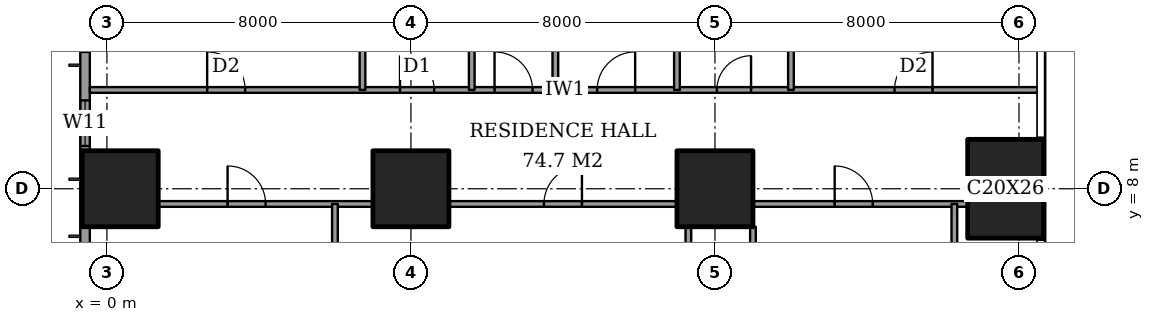
"""IFC4 building model, lengths in metres.
Left out: names, types, materials, properties, quantities, classifications, styles, units other than length and angle.
Written with IfcOpenShell. Run it as: python <this file> out.ifc"""

import sys

from ifc_helpers import new_model, si_unit, direction, frame, frame_2d, origin, origin_2d, place, context, subcontext, project, spatial, rectangle, extrude, element, fill, save


model = new_model("IFC4")
c1 = context("Model", 3, precision=1e-05, world=origin(), true_north=direction((0.0, 1.0)))
c2 = subcontext(c1, "Body", "Model", "MODEL_VIEW")
j1 = project(units=[si_unit("LENGTHUNIT", "METRE"), si_unit("PLANEANGLEUNIT", "RADIAN")], contexts=[c1])
p1 = place(None, origin())
s1 = spatial("IfcSite", under=j1, at=p1, CompositionType="ELEMENT")
p2 = place(p1, origin())
s2 = spatial("IfcBuilding", under=s1, at=p2, CompositionType="ELEMENT")
p3 = place(p2, frame((0.0, 0.0, 110.6)))
s3 = spatial("IfcBuildingStorey", under=s2, at=p3, CompositionType="ELEMENT", Elevation=110.6)
for number, where, z_axis, x_axis in (
    (1, (0.35, 8.0, 0.0), (0.0, 0.0, 1.0), (1.0, 0.0, 0.0)),
    (2, (8.0, 8.0, 0.0), (0.0, 0.0, 1.0), (1.0, 0.0, 0.0)),
    (3, (16.0, 8.0, 0.0), (0.0, 0.0, 1.0), (1.0, 0.0, 0.0)),
):
    element("IfcColumn", number, at=place(p3, frame(where, z_axis=z_axis, x_axis=x_axis)), inside=s3, PredefinedType="COLUMN", context=c2, shape_type="SweptSolid", body=[
        extrude(rectangle(XDim=2.0, YDim=2.0, at=origin_2d()), origin(), (0.0, 0.0, 1.0), 3.6),
    ])
p4 = place(p3, frame((23.65, 8.0, 0.0), z_axis=(0.0, 0.0, 1.0), x_axis=(1.0, 0.0, 0.0)))
e4 = element("IfcColumn", 4, at=p4, inside=s3, PredefinedType="COLUMN", context=c2, shape_type="SweptSolid", body=[
    extrude(rectangle(XDim=2.0, YDim=2.6, at=origin_2d()), origin(), (0.0, 0.0, 1.0), 3.6),
])
p5 = place(p3, frame((-0.575, 44.825, 0.0), z_axis=(0.0, 0.0, 1.0), x_axis=(0.0, -1.0, 0.0)))
e5 = element("IfcWall", 5, at=p5, inside=s3, PredefinedType="SOLIDWALL", context=c2, shape_type="SweptSolid", body=[
    extrude(rectangle(XDim=41.65, YDim=0.25, at=frame_2d((20.825, 0.0))), origin(), (0.0, 0.0, 1.0), 3.6),
])
p6 = place(p5, frame((0.775, 0.0, 0.4)))
e6 = element("IfcOpeningElement", 6, at=p6, cuts=e5, PredefinedType="OPENING", context=c2, shape_type="SweptSolid", body=[
    extrude(rectangle(XDim=2.4, YDim=2.2, at=frame_2d((1.2, 1.1))), frame((0.0, 0.135, 0.0), z_axis=(0.0, -1.0, 0.0), x_axis=(1.0, 0.0, 0.0)), (0.0, 0.0, 1.0), 0.27),
])
p7 = place(p5, frame((6.2, 0.0, 0.4)))
e7 = element("IfcOpeningElement", 7, at=p7, cuts=e5, PredefinedType="OPENING", context=c2, shape_type="SweptSolid", body=[
    extrude(rectangle(XDim=1.2, YDim=2.2, at=frame_2d((0.6, 1.1))), frame((0.0, 0.135, 0.0), z_axis=(0.0, -1.0, 0.0), x_axis=(1.0, 0.0, 0.0)), (0.0, 0.0, 1.0), 0.27),
])
p8 = place(p5, frame((8.525, 0.0, 0.4)))
e8 = element("IfcOpeningElement", 8, at=p8, cuts=e5, PredefinedType="OPENING", context=c2, shape_type="SweptSolid", body=[
    extrude(rectangle(XDim=2.4, YDim=2.2, at=frame_2d((1.2, 1.1))), frame((0.0, 0.135, 0.0), z_axis=(0.0, -1.0, 0.0), x_axis=(1.0, 0.0, 0.0)), (0.0, 0.0, 1.0), 0.27),
])
p9 = place(p5, frame((15.625, 0.0, 0.4)))
e9 = element("IfcOpeningElement", 9, at=p9, cuts=e5, PredefinedType="OPENING", context=c2, shape_type="SweptSolid", body=[
    extrude(rectangle(XDim=2.4, YDim=2.2, at=frame_2d((1.2, 1.1))), frame((0.0, 0.135, 0.0), z_axis=(0.0, -1.0, 0.0), x_axis=(1.0, 0.0, 0.0)), (0.0, 0.0, 1.0), 0.27),
])
p10 = place(p5, frame((23.625, 0.0, 0.4)))
e10 = element("IfcOpeningElement", 10, at=p10, cuts=e5, PredefinedType="OPENING", context=c2, shape_type="SweptSolid", body=[
    extrude(rectangle(XDim=2.4, YDim=2.2, at=frame_2d((1.2, 1.1))), frame((0.0, 0.135, 0.0), z_axis=(0.0, -1.0, 0.0), x_axis=(1.0, 0.0, 0.0)), (0.0, 0.0, 1.0), 0.27),
])
p11 = place(p5, frame((30.825, 0.0, 0.4)))
e11 = element("IfcOpeningElement", 11, at=p11, cuts=e5, PredefinedType="OPENING", context=c2, shape_type="SweptSolid", body=[
    extrude(rectangle(XDim=2.4, YDim=2.2, at=frame_2d((1.2, 1.1))), frame((0.0, 0.135, 0.0), z_axis=(0.0, -1.0, 0.0), x_axis=(1.0, 0.0, 0.0)), (0.0, 0.0, 1.0), 0.27),
])
p12 = place(p5, frame((34.5, 0.0, 0.4)))
e12 = element("IfcOpeningElement", 12, at=p12, cuts=e5, PredefinedType="OPENING", context=c2, shape_type="SweptSolid", body=[
    extrude(rectangle(XDim=1.2, YDim=2.2, at=frame_2d((0.6, 1.1))), frame((0.0, 0.135, 0.0), z_axis=(0.0, -1.0, 0.0), x_axis=(1.0, 0.0, 0.0)), (0.0, 0.0, 1.0), 0.27),
])
p13 = place(p5, frame((38.475, 0.0, 0.4)))
e13 = element("IfcOpeningElement", 13, at=p13, cuts=e5, PredefinedType="OPENING", context=c2, shape_type="SweptSolid", body=[
    extrude(rectangle(XDim=2.4, YDim=2.2, at=frame_2d((1.2, 1.1))), frame((0.0, 0.135, 0.0), z_axis=(0.0, -1.0, 0.0), x_axis=(1.0, 0.0, 0.0)), (0.0, 0.0, 1.0), 0.27),
])
p14 = place(p3, frame((1.35, 7.6, 0.0), z_axis=(0.0, 0.0, 1.0), x_axis=(1.0, 0.0, 0.0)))
e14 = element("IfcWall", 14, at=p14, inside=s3, PredefinedType="PARTITIONING", context=c2, shape_type="SweptSolid", body=[
    extrude(rectangle(XDim=5.65, YDim=0.15, at=frame_2d((2.825, 0.0))), origin(), (0.0, 0.0, 1.0), 3.35),
])
p15 = place(p14, frame((1.825, 0.0, 0.0)))
e15 = element("IfcOpeningElement", 15, at=p15, cuts=e14, PredefinedType="OPENING", context=c2, shape_type="SweptSolid", body=[
    extrude(rectangle(XDim=1.0, YDim=2.1, at=frame_2d((0.5, 1.05))), frame((0.0, 0.085, 0.0), z_axis=(0.0, -1.0, 0.0), x_axis=(1.0, 0.0, 0.0)), (0.0, 0.0, 1.0), 0.17),
])
p16 = place(p3, frame((9.0, 7.6, 0.0), z_axis=(0.0, 0.0, 1.0), x_axis=(1.0, 0.0, 0.0)))
e16 = element("IfcWall", 16, at=p16, inside=s3, PredefinedType="PARTITIONING", context=c2, shape_type="SweptSolid", body=[
    extrude(rectangle(XDim=6.0, YDim=0.15, at=frame_2d((3.0, 0.0))), origin(), (0.0, 0.0, 1.0), 3.35),
])
p17 = place(p16, frame((2.5, 0.0, 0.0)))
e17 = element("IfcOpeningElement", 17, at=p17, cuts=e16, PredefinedType="OPENING", context=c2, shape_type="SweptSolid", body=[
    extrude(rectangle(XDim=1.0, YDim=2.1, at=frame_2d((0.5, 1.05))), frame((0.0, 0.085, 0.0), z_axis=(0.0, -1.0, 0.0), x_axis=(1.0, 0.0, 0.0)), (0.0, 0.0, 1.0), 0.17),
])
p18 = place(p3, frame((17.0, 7.6, 0.0), z_axis=(0.0, 0.0, 1.0), x_axis=(1.0, 0.0, 0.0)))
e18 = element("IfcWall", 18, at=p18, inside=s3, PredefinedType="PARTITIONING", context=c2, shape_type="SweptSolid", body=[
    extrude(rectangle(XDim=5.65, YDim=0.15, at=frame_2d((2.825, 0.0))), origin(), (0.0, 0.0, 1.0), 3.35),
])
p19 = place(p18, frame((2.15, 0.0, 0.0)))
e19 = element("IfcOpeningElement", 19, at=p19, cuts=e18, PredefinedType="OPENING", context=c2, shape_type="SweptSolid", body=[
    extrude(rectangle(XDim=1.0, YDim=2.1, at=frame_2d((0.5, 1.05))), frame((0.0, 0.085, 0.0), z_axis=(0.0, -1.0, 0.0), x_axis=(1.0, 0.0, 0.0)), (0.0, 0.0, 1.0), 0.17),
])
p20 = place(p3, frame((-0.45, 10.6, 0.0), z_axis=(0.0, 0.0, 1.0), x_axis=(1.0, 0.0, 0.0)))
e20 = element("IfcWall", 20, at=p20, inside=s3, PredefinedType="PARTITIONING", context=c2, shape_type="SweptSolid", body=[
    extrude(rectangle(XDim=25.011, YDim=0.15, at=frame_2d((12.505, 0.0))), origin(), (0.0, 0.0, 1.0), 3.35),
])
p21 = place(p20, frame((10.65, 0.0, 0.0)))
e21 = element("IfcOpeningElement", 21, at=p21, cuts=e20, PredefinedType="OPENING", context=c2, shape_type="SweptSolid", body=[
    extrude(rectangle(XDim=1.0, YDim=2.1, at=frame_2d((0.5, 1.05))), frame((0.0, 0.085, 0.0), z_axis=(0.0, -1.0, 0.0), x_axis=(1.0, 0.0, 0.0)), (0.0, 0.0, 1.0), 0.17),
])
p22 = place(p20, frame((3.087, 0.0, 0.0)))
e22 = element("IfcOpeningElement", 22, at=p22, cuts=e20, PredefinedType="OPENING", context=c2, shape_type="SweptSolid", body=[
    extrude(rectangle(XDim=1.0, YDim=2.1, at=frame_2d((0.5, 1.05))), frame((0.0, 0.085, 0.0), z_axis=(0.0, -1.0, 0.0), x_axis=(1.0, 0.0, 0.0)), (0.0, 0.0, 1.0), 0.17),
])
p23 = place(p20, frame((8.163, 0.0, 0.0)))
e23 = element("IfcOpeningElement", 23, at=p23, cuts=e20, PredefinedType="OPENING", context=c2, shape_type="SweptSolid", body=[
    extrude(rectangle(XDim=0.9, YDim=2.1, at=frame_2d((0.45, 1.05))), frame((0.0, 0.085, 0.0), z_axis=(0.0, -1.0, 0.0), x_axis=(1.0, 0.0, 0.0)), (0.0, 0.0, 1.0), 0.17),
])
p24 = place(p20, frame((13.35, 0.0, 0.0)))
e24 = element("IfcOpeningElement", 24, at=p24, cuts=e20, PredefinedType="OPENING", context=c2, shape_type="SweptSolid", body=[
    extrude(rectangle(XDim=1.0, YDim=2.1, at=frame_2d((0.5, 1.05))), frame((0.0, 0.085, 0.0), z_axis=(0.0, -1.0, 0.0), x_axis=(1.0, 0.0, 0.0)), (0.0, 0.0, 1.0), 0.17),
])
p25 = place(p20, frame((16.5, 0.0, 0.0)))
e25 = element("IfcOpeningElement", 25, at=p25, cuts=e20, PredefinedType="OPENING", context=c2, shape_type="SweptSolid", body=[
    extrude(rectangle(XDim=0.9, YDim=2.1, at=frame_2d((0.45, 1.05))), frame((0.0, 0.085, 0.0), z_axis=(0.0, -1.0, 0.0), x_axis=(1.0, 0.0, 0.0)), (0.0, 0.0, 1.0), 0.17),
])
p26 = place(p20, frame((21.175, 0.0, 0.0)))
e26 = element("IfcOpeningElement", 26, at=p26, cuts=e20, PredefinedType="OPENING", context=c2, shape_type="SweptSolid", body=[
    extrude(rectangle(XDim=1.0, YDim=2.1, at=frame_2d((0.5, 1.05))), frame((0.0, 0.085, 0.0), z_axis=(0.0, -1.0, 0.0), x_axis=(1.0, 0.0, 0.0)), (0.0, 0.0, 1.0), 0.17),
])
p27 = place(p3, frame((6.0, -0.45, 0.0), z_axis=(0.0, 0.0, 1.0), x_axis=(0.0, 1.0, 0.0)))
e27 = element("IfcWall", 27, at=p27, inside=s3, PredefinedType="PARTITIONING", context=c2, shape_type="SweptSolid", body=[
    extrude(rectangle(XDim=8.05, YDim=0.15, at=frame_2d((4.025, 0.0))), origin(), (0.0, 0.0, 1.0), 3.35),
])
p28 = place(p3, frame((6.725, 10.6, 0.0), z_axis=(0.0, 0.0, 1.0), x_axis=(0.0, 1.0, 0.0)))
e28 = element("IfcWall", 28, at=p28, inside=s3, PredefinedType="PARTITIONING", context=c2, shape_type="SweptSolid", body=[
    extrude(rectangle(XDim=4.2, YDim=0.15, at=frame_2d((2.1, 0.0))), origin(), (0.0, 0.0, 1.0), 3.35),
])
p29 = place(p3, frame((9.6, 10.6, 0.0), z_axis=(0.0, 0.0, 1.0), x_axis=(0.0, 1.0, 0.0)))
e29 = element("IfcWall", 29, at=p29, inside=s3, PredefinedType="PARTITIONING", context=c2, shape_type="SweptSolid", body=[
    extrude(rectangle(XDim=11.0, YDim=0.15, at=frame_2d((5.5, 0.0))), origin(), (0.0, 0.0, 1.0), 3.35),
])
p30 = place(p29, frame((8.7, 0.0, 0.0)))
e30 = element("IfcOpeningElement", 30, at=p30, cuts=e29, PredefinedType="OPENING", context=c2, shape_type="SweptSolid", body=[
    extrude(rectangle(XDim=1.0, YDim=2.1, at=frame_2d((0.5, 1.05))), frame((0.0, 0.085, 0.0), z_axis=(0.0, -1.0, 0.0), x_axis=(1.0, 0.0, 0.0)), (0.0, 0.0, 1.0), 0.17),
])
p31 = place(p3, frame((11.8, 10.6, 0.0), z_axis=(0.0, 0.0, 1.0), x_axis=(0.0, 1.0, 0.0)))
e31 = element("IfcWall", 31, at=p31, inside=s3, PredefinedType="PARTITIONING", context=c2, shape_type="SweptSolid", body=[
    extrude(rectangle(XDim=7.4, YDim=0.15, at=frame_2d((3.7, 0.0))), origin(), (0.0, 0.0, 1.0), 3.35),
])
p32 = place(p3, frame((15.0, 10.6, 0.0), z_axis=(0.0, 0.0, 1.0), x_axis=(0.0, 1.0, 0.0)))
e32 = element("IfcWall", 32, at=p32, inside=s3, PredefinedType="PARTITIONING", context=c2, shape_type="SweptSolid", body=[
    extrude(rectangle(XDim=4.2, YDim=0.15, at=frame_2d((2.1, 0.0))), origin(), (0.0, 0.0, 1.0), 3.35),
])
p33 = place(p3, frame((15.3, 1.35, 0.0), z_axis=(0.0, 0.0, 1.0), x_axis=(0.0, 1.0, 0.0)))
e33 = element("IfcWall", 33, at=p33, inside=s3, PredefinedType="PARTITIONING", context=c2, shape_type="SweptSolid", body=[
    extrude(rectangle(XDim=5.65, YDim=0.15, at=frame_2d((2.825, 0.0))), origin(), (0.0, 0.0, 1.0), 3.35),
])
p34 = place(p33, frame((2.375, 0.0, 0.0)))
e34 = element("IfcOpeningElement", 34, at=p34, cuts=e33, PredefinedType="OPENING", context=c2, shape_type="SweptSolid", body=[
    extrude(rectangle(XDim=0.9, YDim=2.1, at=frame_2d((0.45, 1.05))), frame((0.0, 0.085, 0.0), z_axis=(0.0, -1.0, 0.0), x_axis=(1.0, 0.0, 0.0)), (0.0, 0.0, 1.0), 0.17),
])
p35 = place(p3, frame((17.0, 1.35, 0.0), z_axis=(0.0, 0.0, 1.0), x_axis=(0.0, 1.0, 0.0)))
e35 = element("IfcWall", 35, at=p35, inside=s3, PredefinedType="PARTITIONING", context=c2, shape_type="SweptSolid", body=[
    extrude(rectangle(XDim=5.65, YDim=0.15, at=frame_2d((2.825, 0.0))), origin(), (0.0, 0.0, 1.0), 3.35),
])
p36 = place(p3, frame((18.0, 10.6, 0.0), z_axis=(0.0, 0.0, 1.0), x_axis=(0.0, 1.0, 0.0)))
e36 = element("IfcWall", 36, at=p36, inside=s3, PredefinedType="PARTITIONING", context=c2, shape_type="SweptSolid", body=[
    extrude(rectangle(XDim=7.4, YDim=0.15, at=frame_2d((3.7, 0.0))), origin(), (0.0, 0.0, 1.0), 3.35),
])
p37 = place(p3, frame((22.3, -0.45, 0.0), z_axis=(0.0, 0.0, 1.0), x_axis=(0.0, 1.0, 0.0)))
e37 = element("IfcWall", 37, at=p37, inside=s3, PredefinedType="PARTITIONING", context=c2, shape_type="SweptSolid", body=[
    extrude(rectangle(XDim=8.05, YDim=0.15, at=frame_2d((4.025, 0.0))), origin(), (0.0, 0.0, 1.0), 3.35),
])
p38 = place(p37, frame((3.575, 0.0, 0.0)))
e38 = element("IfcOpeningElement", 38, at=p38, cuts=e37, PredefinedType="OPENING", context=c2, shape_type="SweptSolid", body=[
    extrude(rectangle(XDim=0.9, YDim=2.1, at=frame_2d((0.45, 1.05))), frame((0.0, 0.085, 0.0), z_axis=(0.0, -1.0, 0.0), x_axis=(1.0, 0.0, 0.0)), (0.0, 0.0, 1.0), 0.17),
])
p39 = place(p12, origin())
e39 = element("IfcWindow", 39, at=p39, inside=s3, PartitioningType="SINGLE_PANEL", PredefinedType="WINDOW", context=c2, shape_type="SweptSolid", body=[
    extrude(rectangle(XDim=1.2, YDim=2.2, at=frame_2d((0.6, 1.1))), frame((0.0, 0.03, 0.0), z_axis=(0.0, -1.0, 0.0), x_axis=(1.0, 0.0, 0.0)), (0.0, 0.0, 1.0), 0.06),
])
fill(e12, e39)
p40 = place(p15, origin())
e40 = element("IfcDoor", 40, at=p40, inside=s3, OperationType="SINGLE_SWING_RIGHT", PredefinedType="DOOR", context=c2, shape_type="SweptSolid", body=[
    extrude(rectangle(XDim=1.0, YDim=2.1, at=frame_2d((0.5, 1.05))), frame((0.0, 0.025, 0.0), z_axis=(0.0, -1.0, 0.0), x_axis=(1.0, 0.0, 0.0)), (0.0, 0.0, 1.0), 0.05),
])
fill(e15, e40)
p41 = place(p17, origin())
e41 = element("IfcDoor", 41, at=p41, inside=s3, OperationType="SINGLE_SWING_LEFT", PredefinedType="DOOR", context=c2, shape_type="SweptSolid", body=[
    extrude(rectangle(XDim=1.0, YDim=2.1, at=frame_2d((0.5, 1.05))), frame((0.0, 0.025, 0.0), z_axis=(0.0, -1.0, 0.0), x_axis=(1.0, 0.0, 0.0)), (0.0, 0.0, 1.0), 0.05),
])
fill(e17, e41)
p42 = place(p19, origin())
e42 = element("IfcDoor", 42, at=p42, inside=s3, OperationType="SINGLE_SWING_RIGHT", PredefinedType="DOOR", context=c2, shape_type="SweptSolid", body=[
    extrude(rectangle(XDim=1.0, YDim=2.1, at=frame_2d((0.5, 1.05))), frame((0.0, 0.025, 0.0), z_axis=(0.0, -1.0, 0.0), x_axis=(1.0, 0.0, 0.0)), (0.0, 0.0, 1.0), 0.05),
])
fill(e19, e42)
p43 = place(p21, origin())
e43 = element("IfcDoor", 43, at=p43, inside=s3, OperationType="SINGLE_SWING_RIGHT", PredefinedType="DOOR", context=c2, shape_type="SweptSolid", body=[
    extrude(rectangle(XDim=1.0, YDim=2.1, at=frame_2d((0.5, 1.05))), frame((0.0, 0.025, 0.0), z_axis=(0.0, -1.0, 0.0), x_axis=(1.0, 0.0, 0.0)), (0.0, 0.0, 1.0), 0.05),
])
fill(e21, e43)
p44 = place(p22, origin())
e44 = element("IfcDoor", 44, at=p44, inside=s3, OperationType="SINGLE_SWING_RIGHT", PredefinedType="DOOR", context=c2, shape_type="SweptSolid", body=[
    extrude(rectangle(XDim=1.0, YDim=2.1, at=frame_2d((0.5, 1.05))), frame((0.0, 0.025, 0.0), z_axis=(0.0, -1.0, 0.0), x_axis=(1.0, 0.0, 0.0)), (0.0, 0.0, 1.0), 0.05),
])
fill(e22, e44)
p45 = place(p23, origin())
e45 = element("IfcDoor", 45, at=p45, inside=s3, OperationType="SINGLE_SWING_RIGHT", PredefinedType="DOOR", context=c2, shape_type="SweptSolid", body=[
    extrude(rectangle(XDim=0.9, YDim=2.1, at=frame_2d((0.45, 1.05))), frame((0.0, 0.025, 0.0), z_axis=(0.0, -1.0, 0.0), x_axis=(1.0, 0.0, 0.0)), (0.0, 0.0, 1.0), 0.05),
])
fill(e23, e45)
p46 = place(p24, origin())
e46 = element("IfcDoor", 46, at=p46, inside=s3, OperationType="SINGLE_SWING_LEFT", PredefinedType="DOOR", context=c2, shape_type="SweptSolid", body=[
    extrude(rectangle(XDim=1.0, YDim=2.1, at=frame_2d((0.5, 1.05))), frame((0.0, 0.025, 0.0), z_axis=(0.0, -1.0, 0.0), x_axis=(1.0, 0.0, 0.0)), (0.0, 0.0, 1.0), 0.05),
])
fill(e24, e46)
p47 = place(p25, origin())
e47 = element("IfcDoor", 47, at=p47, inside=s3, OperationType="SINGLE_SWING_LEFT", PredefinedType="DOOR", context=c2, shape_type="SweptSolid", body=[
    extrude(rectangle(XDim=0.9, YDim=2.1, at=frame_2d((0.45, 1.05))), frame((0.0, 0.025, 0.0), z_axis=(0.0, -1.0, 0.0), x_axis=(1.0, 0.0, 0.0)), (0.0, 0.0, 1.0), 0.05),
])
fill(e25, e47)
p48 = place(p26, origin())
e48 = element("IfcDoor", 48, at=p48, inside=s3, OperationType="SINGLE_SWING_LEFT", PredefinedType="DOOR", context=c2, shape_type="SweptSolid", body=[
    extrude(rectangle(XDim=1.0, YDim=2.1, at=frame_2d((0.5, 1.05))), frame((0.0, 0.025, 0.0), z_axis=(0.0, -1.0, 0.0), x_axis=(1.0, 0.0, 0.0)), (0.0, 0.0, 1.0), 0.05),
])
fill(e26, e48)
save(model, sys.argv[1])
